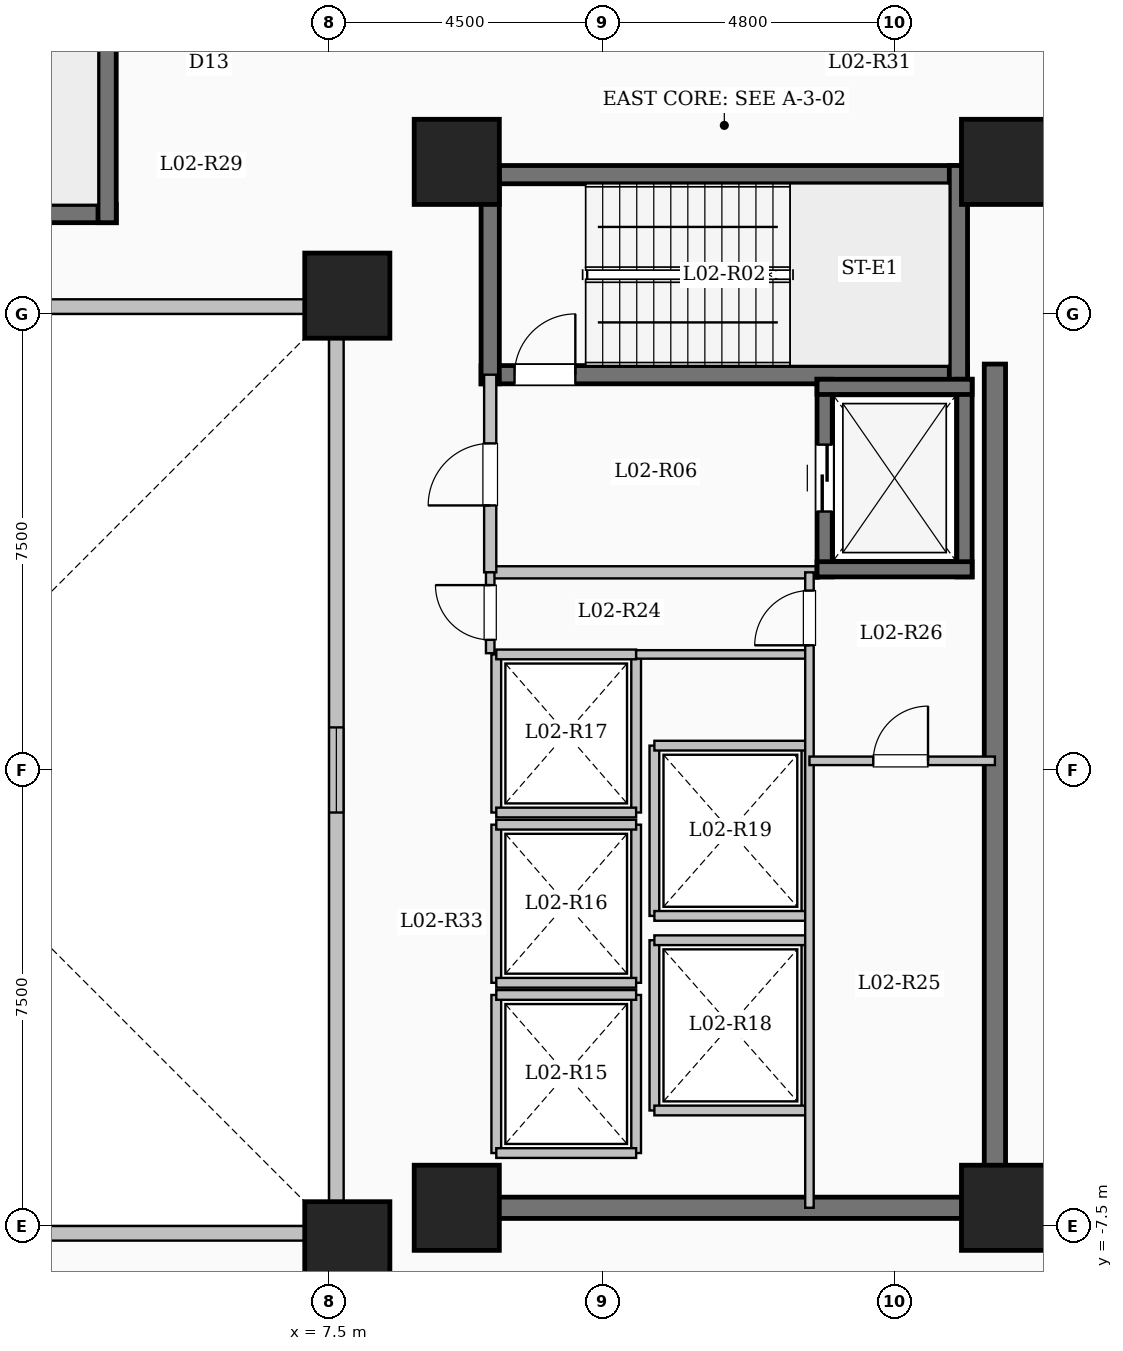
"""IFC4 building model, lengths in metres.
Left out: names, types, materials, properties, quantities, classifications, styles, units other than length and angle.
Written with IfcOpenShell. Run it as: python <this file> out.ifc"""

import sys

from ifc_helpers import new_model, si_unit, direction, frame, frame_2d, origin, origin_2d, place, context, subcontext, project, spatial, rectangle, extrude, element, fill, save


model = new_model("IFC4")
c1 = context("Model", 3, precision=1e-05, world=origin(), true_north=direction((0.0, 1.0)))
c2 = subcontext(c1, "Body", "Model", "MODEL_VIEW")
j1 = project(units=[si_unit("LENGTHUNIT", "METRE"), si_unit("PLANEANGLEUNIT", "RADIAN")], contexts=[c1])
p1 = place(None, origin())
s1 = spatial("IfcSite", under=j1, at=p1, CompositionType="ELEMENT")
p2 = place(p1, origin())
s2 = spatial("IfcBuilding", under=s1, at=p2, CompositionType="ELEMENT")
p3 = place(p2, frame((0.0, 0.0, 9.9)))
s3 = spatial("IfcBuildingStorey", under=s2, at=p3, CompositionType="ELEMENT", Elevation=9.9)
for number, where, z_axis, x_axis in (
    (1, (7.8, -7.8, 0.0), (0.0, 0.0, 1.0), (1.0, 0.0, 0.0)),
    (2, (7.8, 7.8, 0.0), (0.0, 0.0, 1.0), (1.0, 0.0, 0.0)),
    (3, (9.6, -7.2, 0.0), (0.0, 0.0, 1.0), (1.0, 0.0, 0.0)),
    (4, (9.6, 10.0, 0.0), (0.0, 0.0, 1.0), (1.0, 0.0, 0.0)),
    (5, (18.6, -7.2, 0.0), (0.0, 0.0, 1.0), (1.0, 0.0, 0.0)),
    (6, (18.6, 10.0, 0.0), (0.0, 0.0, 1.0), (1.0, 0.0, 0.0)),
):
    element("IfcColumn", number, at=place(p3, frame(where, z_axis=z_axis, x_axis=x_axis)), inside=s3, PredefinedType="COLUMN", context=c2, shape_type="SweptSolid", body=[
        extrude(rectangle(XDim=1.4, YDim=1.4, at=origin_2d()), origin(), (0.0, 0.0, 1.0), 4.5),
    ])
p4 = place(p3, frame((-7.62, -7.62, 0.0), z_axis=(0.0, 0.0, 1.0), x_axis=(1.0, 0.0, 0.0)))
e7 = element("IfcWall", 7, at=p4, inside=s3, PredefinedType="SOLIDWALL", context=c2, shape_type="SweptSolid", body=[
    extrude(rectangle(XDim=15.24, YDim=0.24, at=frame_2d((7.62, 0.0))), origin(), (0.0, 0.0, 1.0), 4.2),
])
p5 = place(p4, frame((6.92, 0.0, 0.95)))
e8 = element("IfcOpeningElement", 8, at=p5, cuts=e7, PredefinedType="OPENING", context=c2, shape_type="SweptSolid", body=[
    extrude(rectangle(XDim=1.4, YDim=1.5, at=frame_2d((0.7, 0.75))), frame((0.0, 0.13, 0.0), z_axis=(0.0, -1.0, 0.0), x_axis=(1.0, 0.0, 0.0)), (0.0, 0.0, 1.0), 0.26),
])
p6 = place(p3, frame((7.62, -7.62, 0.0), z_axis=(0.0, 0.0, 1.0), x_axis=(0.0, 1.0, 0.0)))
e9 = element("IfcWall", 9, at=p6, inside=s3, PredefinedType="SOLIDWALL", context=c2, shape_type="SweptSolid", body=[
    extrude(rectangle(XDim=15.24, YDim=0.24, at=frame_2d((7.62, 0.0))), origin(), (0.0, 0.0, 1.0), 4.2),
])
p7 = place(p6, frame((6.92, 0.0, 0.95)))
e10 = element("IfcOpeningElement", 10, at=p7, cuts=e9, PredefinedType="OPENING", context=c2, shape_type="SweptSolid", body=[
    extrude(rectangle(XDim=1.4, YDim=1.5, at=frame_2d((0.7, 0.75))), frame((0.0, 0.13, 0.0), z_axis=(0.0, -1.0, 0.0), x_axis=(1.0, 0.0, 0.0)), (0.0, 0.0, 1.0), 0.26),
])
p8 = place(p3, frame((7.62, 7.62, 0.0), z_axis=(0.0, 0.0, 1.0), x_axis=(-1.0, 0.0, 0.0)))
e11 = element("IfcWall", 11, at=p8, inside=s3, PredefinedType="SOLIDWALL", context=c2, shape_type="SweptSolid", body=[
    extrude(rectangle(XDim=15.24, YDim=0.24, at=frame_2d((7.62, 0.0))), origin(), (0.0, 0.0, 1.0), 4.2),
])
p9 = place(p8, frame((6.92, 0.0, 0.95)))
e12 = element("IfcOpeningElement", 12, at=p9, cuts=e11, PredefinedType="OPENING", context=c2, shape_type="SweptSolid", body=[
    extrude(rectangle(XDim=1.4, YDim=1.5, at=frame_2d((0.7, 0.75))), frame((0.0, 0.13, 0.0), z_axis=(0.0, -1.0, 0.0), x_axis=(1.0, 0.0, 0.0)), (0.0, 0.0, 1.0), 0.26),
])
p10 = place(p3, frame((10.0, 9.79, 0.0), z_axis=(0.0, 0.0, 1.0), x_axis=(1.0, 0.0, 0.0)))
e13 = element("IfcWall", 13, at=p10, inside=s3, PredefinedType="SHEAR", context=c2, shape_type="SweptSolid", body=[
    extrude(rectangle(XDim=8.0, YDim=0.3, at=frame_2d((4.0, 0.0))), origin(), (0.0, 0.0, 1.0), 4.5),
])
p11 = place(p3, frame((10.0, 6.5, 0.0), z_axis=(0.0, 0.0, 1.0), x_axis=(1.0, 0.0, 0.0)))
e14 = element("IfcWall", 14, at=p11, inside=s3, PredefinedType="SHEAR", context=c2, shape_type="SweptSolid", body=[
    extrude(rectangle(XDim=8.0, YDim=0.3, at=frame_2d((4.0, 0.0))), origin(), (0.0, 0.0, 1.0), 4.5),
])
p12 = place(p11, frame((0.55, 0.0, 0.0)))
e15 = element("IfcOpeningElement", 15, at=p12, cuts=e14, PredefinedType="OPENING", context=c2, shape_type="SweptSolid", body=[
    extrude(rectangle(XDim=1.0, YDim=2.15, at=frame_2d((0.5, 1.075))), frame((0.0, 0.16, 0.0), z_axis=(0.0, -1.0, 0.0), x_axis=(1.0, 0.0, 0.0)), (0.0, 0.0, 1.0), 0.32),
])
for number, where, z_axis, x_axis in (
    (16, (10.15, 6.35, 0.0), (0.0, 0.0, 1.0), (0.0, 1.0, 0.0)),
    (17, (17.85, 6.35, 0.0), (0.0, 0.0, 1.0), (0.0, 1.0, 0.0)),
):
    element("IfcWall", number, at=place(p3, frame(where, z_axis=z_axis, x_axis=x_axis)), inside=s3, PredefinedType="SHEAR", context=c2, shape_type="SweptSolid", body=[
        extrude(rectangle(XDim=3.59, YDim=0.3, at=frame_2d((1.795, 0.0))), origin(), (0.0, 0.0, 1.0), 4.5),
    ])
p13 = place(p3, frame((-4.0, 9.15, 0.0), z_axis=(0.0, 0.0, 1.0), x_axis=(1.0, 0.0, 0.0)))
e18 = element("IfcWall", 18, at=p13, inside=s3, PredefinedType="SHEAR", context=c2, shape_type="SweptSolid", body=[
    extrude(rectangle(XDim=8.0, YDim=0.3, at=frame_2d((4.0, 0.0))), origin(), (0.0, 0.0, 1.0), 4.5),
])
p14 = place(p13, frame((0.55, 0.0, 0.0)))
e19 = element("IfcOpeningElement", 19, at=p14, cuts=e18, PredefinedType="OPENING", context=c2, shape_type="SweptSolid", body=[
    extrude(rectangle(XDim=1.0, YDim=2.15, at=frame_2d((0.5, 1.075))), frame((0.0, 0.16, 0.0), z_axis=(0.0, -1.0, 0.0), x_axis=(1.0, 0.0, 0.0)), (0.0, 0.0, 1.0), 0.32),
])
p15 = place(p3, frame((3.85, 9.0, 0.0), z_axis=(0.0, 0.0, 1.0), x_axis=(0.0, 1.0, 0.0)))
e20 = element("IfcWall", 20, at=p15, inside=s3, PredefinedType="SHEAR", context=c2, shape_type="SweptSolid", body=[
    extrude(rectangle(XDim=3.59, YDim=0.3, at=frame_2d((1.795, 0.0))), origin(), (0.0, 0.0, 1.0), 4.5),
])
p16 = place(p3, frame((10.15, 3.25, 0.0), z_axis=(0.0, 0.0, 1.0), x_axis=(1.0, 0.0, 0.0)))
e21 = element("IfcWall", 21, at=p16, inside=s3, PredefinedType="SOLIDWALL", context=c2, shape_type="SweptSolid", body=[
    extrude(rectangle(XDim=5.4, YDim=0.2, at=frame_2d((2.7, 0.0))), origin(), (0.0, 0.0, 1.0), 4.2),
])
p17 = place(p3, frame((10.15, 3.25, 0.0), z_axis=(0.0, 0.0, 1.0), x_axis=(0.0, 1.0, 0.0)))
e22 = element("IfcWall", 22, at=p17, inside=s3, PredefinedType="SOLIDWALL", context=c2, shape_type="SweptSolid", body=[
    extrude(rectangle(XDim=3.25, YDim=0.2, at=frame_2d((1.625, 0.0))), origin(), (0.0, 0.0, 1.0), 4.2),
])
p18 = place(p17, frame((1.1, 0.0, 0.0)))
e23 = element("IfcOpeningElement", 23, at=p18, cuts=e22, PredefinedType="OPENING", context=c2, shape_type="SweptSolid", body=[
    extrude(rectangle(XDim=1.02, YDim=2.15, at=frame_2d((0.51, 1.075))), frame((0.0, 0.11, 0.0), z_axis=(0.0, -1.0, 0.0), x_axis=(1.0, 0.0, 0.0)), (0.0, 0.0, 1.0), 0.22),
])
p19 = place(p3, frame((15.65, 3.175, 0.0), z_axis=(0.0, 0.0, 1.0), x_axis=(0.0, 1.0, 0.0)))
e24 = element("IfcWall", 24, at=p19, inside=s3, PredefinedType="SHEAR", context=c2, shape_type="SweptSolid", body=[
    extrude(rectangle(XDim=3.25, YDim=0.25, at=frame_2d((1.625, 0.0))), origin(), (0.0, 0.0, 1.0), 4.5),
])
p20 = place(p19, frame((1.075, 0.0, 0.0)))
e25 = element("IfcOpeningElement", 25, at=p20, cuts=e24, PredefinedType="OPENING", context=c2, shape_type="SweptSolid", body=[
    extrude(rectangle(XDim=1.1, YDim=2.15, at=frame_2d((0.55, 1.075))), frame((0.0, 0.135, 0.0), z_axis=(0.0, -1.0, 0.0), x_axis=(1.0, 0.0, 0.0)), (0.0, 0.0, 1.0), 0.27),
])
p21 = place(p3, frame((17.95, 3.175, 0.0), z_axis=(0.0, 0.0, 1.0), x_axis=(0.0, 1.0, 0.0)))
e26 = element("IfcWall", 26, at=p21, inside=s3, PredefinedType="SHEAR", context=c2, shape_type="SweptSolid", body=[
    extrude(rectangle(XDim=3.25, YDim=0.25, at=frame_2d((1.625, 0.0))), origin(), (0.0, 0.0, 1.0), 4.5),
])
for number, where, z_axis, x_axis in (
    (27, (15.525, 3.3, 0.0), (0.0, 0.0, 1.0), (1.0, 0.0, 0.0)),
    (28, (15.525, 6.3, 0.0), (0.0, 0.0, 1.0), (1.0, 0.0, 0.0)),
):
    element("IfcWall", number, at=place(p3, frame(where, z_axis=z_axis, x_axis=x_axis)), inside=s3, PredefinedType="SHEAR", context=c2, shape_type="SweptSolid", body=[
        extrude(rectangle(XDim=2.55, YDim=0.25, at=frame_2d((1.275, 0.0))), origin(), (0.0, 0.0, 1.0), 4.5),
    ])
for number, where, z_axis, x_axis in (
    (29, (10.25, -6.3, 0.0), (0.0, 0.0, 1.0), (0.0, 1.0, 0.0)),
    (30, (12.55, -6.3, 0.0), (0.0, 0.0, 1.0), (0.0, 1.0, 0.0)),
):
    element("IfcWall", number, at=place(p3, frame(where, z_axis=z_axis, x_axis=x_axis)), inside=s3, PredefinedType="SOLIDWALL", context=c2, shape_type="SweptSolid", body=[
        extrude(rectangle(XDim=2.6, YDim=0.16, at=frame_2d((1.3, 0.0))), origin(), (0.0, 0.0, 1.0), 4.2),
    ])
for number, where, z_axis, x_axis in (
    (31, (10.25, -6.3, 0.0), (0.0, 0.0, 1.0), (1.0, 0.0, 0.0)),
    (32, (10.25, -3.7, 0.0), (0.0, 0.0, 1.0), (1.0, 0.0, 0.0)),
):
    element("IfcWall", number, at=place(p3, frame(where, z_axis=z_axis, x_axis=x_axis)), inside=s3, PredefinedType="SOLIDWALL", context=c2, shape_type="SweptSolid", body=[
        extrude(rectangle(XDim=2.3, YDim=0.16, at=frame_2d((1.15, 0.0))), origin(), (0.0, 0.0, 1.0), 4.2),
    ])
for number, where, z_axis, x_axis in (
    (33, (10.25, -3.5, 0.0), (0.0, 0.0, 1.0), (0.0, 1.0, 0.0)),
    (34, (12.55, -3.5, 0.0), (0.0, 0.0, 1.0), (0.0, 1.0, 0.0)),
):
    element("IfcWall", number, at=place(p3, frame(where, z_axis=z_axis, x_axis=x_axis)), inside=s3, PredefinedType="SOLIDWALL", context=c2, shape_type="SweptSolid", body=[
        extrude(rectangle(XDim=2.6, YDim=0.16, at=frame_2d((1.3, 0.0))), origin(), (0.0, 0.0, 1.0), 4.2),
    ])
for number, where, z_axis, x_axis in (
    (35, (10.25, -3.5, 0.0), (0.0, 0.0, 1.0), (1.0, 0.0, 0.0)),
    (36, (10.25, -0.9, 0.0), (0.0, 0.0, 1.0), (1.0, 0.0, 0.0)),
):
    element("IfcWall", number, at=place(p3, frame(where, z_axis=z_axis, x_axis=x_axis)), inside=s3, PredefinedType="SOLIDWALL", context=c2, shape_type="SweptSolid", body=[
        extrude(rectangle(XDim=2.3, YDim=0.16, at=frame_2d((1.15, 0.0))), origin(), (0.0, 0.0, 1.0), 4.2),
    ])
for number, where, z_axis, x_axis in (
    (37, (10.25, -0.7, 0.0), (0.0, 0.0, 1.0), (0.0, 1.0, 0.0)),
    (38, (12.55, -0.7, 0.0), (0.0, 0.0, 1.0), (0.0, 1.0, 0.0)),
):
    element("IfcWall", number, at=place(p3, frame(where, z_axis=z_axis, x_axis=x_axis)), inside=s3, PredefinedType="SOLIDWALL", context=c2, shape_type="SweptSolid", body=[
        extrude(rectangle(XDim=2.6, YDim=0.16, at=frame_2d((1.3, 0.0))), origin(), (0.0, 0.0, 1.0), 4.2),
    ])
for number, where, z_axis, x_axis in (
    (39, (10.25, -0.7, 0.0), (0.0, 0.0, 1.0), (1.0, 0.0, 0.0)),
    (40, (10.25, 1.9, 0.0), (0.0, 0.0, 1.0), (1.0, 0.0, 0.0)),
):
    element("IfcWall", number, at=place(p3, frame(where, z_axis=z_axis, x_axis=x_axis)), inside=s3, PredefinedType="SOLIDWALL", context=c2, shape_type="SweptSolid", body=[
        extrude(rectangle(XDim=2.3, YDim=0.16, at=frame_2d((1.15, 0.0))), origin(), (0.0, 0.0, 1.0), 4.2),
    ])
for number, where, z_axis, x_axis in (
    (41, (12.85, -5.6, 0.0), (0.0, 0.0, 1.0), (0.0, 1.0, 0.0)),
    (42, (15.35, -5.6, 0.0), (0.0, 0.0, 1.0), (0.0, 1.0, 0.0)),
):
    element("IfcWall", number, at=place(p3, frame(where, z_axis=z_axis, x_axis=x_axis)), inside=s3, PredefinedType="SOLIDWALL", context=c2, shape_type="SweptSolid", body=[
        extrude(rectangle(XDim=2.8, YDim=0.16, at=frame_2d((1.4, 0.0))), origin(), (0.0, 0.0, 1.0), 4.2),
    ])
for number, where, z_axis, x_axis in (
    (43, (12.85, -5.6, 0.0), (0.0, 0.0, 1.0), (1.0, 0.0, 0.0)),
    (44, (12.85, -2.8, 0.0), (0.0, 0.0, 1.0), (1.0, 0.0, 0.0)),
):
    element("IfcWall", number, at=place(p3, frame(where, z_axis=z_axis, x_axis=x_axis)), inside=s3, PredefinedType="SOLIDWALL", context=c2, shape_type="SweptSolid", body=[
        extrude(rectangle(XDim=2.5, YDim=0.16, at=frame_2d((1.25, 0.0))), origin(), (0.0, 0.0, 1.0), 4.2),
    ])
for number, where, z_axis, x_axis in (
    (45, (12.85, -2.4, 0.0), (0.0, 0.0, 1.0), (0.0, 1.0, 0.0)),
    (46, (15.35, -2.4, 0.0), (0.0, 0.0, 1.0), (0.0, 1.0, 0.0)),
):
    element("IfcWall", number, at=place(p3, frame(where, z_axis=z_axis, x_axis=x_axis)), inside=s3, PredefinedType="SOLIDWALL", context=c2, shape_type="SweptSolid", body=[
        extrude(rectangle(XDim=2.8, YDim=0.16, at=frame_2d((1.4, 0.0))), origin(), (0.0, 0.0, 1.0), 4.2),
    ])
for number, where, z_axis, x_axis in (
    (47, (12.85, -2.4, 0.0), (0.0, 0.0, 1.0), (1.0, 0.0, 0.0)),
    (48, (12.85, 0.4, 0.0), (0.0, 0.0, 1.0), (1.0, 0.0, 0.0)),
):
    element("IfcWall", number, at=place(p3, frame(where, z_axis=z_axis, x_axis=x_axis)), inside=s3, PredefinedType="SOLIDWALL", context=c2, shape_type="SweptSolid", body=[
        extrude(rectangle(XDim=2.5, YDim=0.16, at=frame_2d((1.25, 0.0))), origin(), (0.0, 0.0, 1.0), 4.2),
    ])
p22 = place(p3, frame((18.45, -7.375, 0.0), z_axis=(0.0, 0.0, 1.0), x_axis=(0.0, 1.0, 0.0)))
e49 = element("IfcWall", 49, at=p22, inside=s3, PredefinedType="SHEAR", context=c2, shape_type="SweptSolid", body=[
    extrude(rectangle(XDim=14.05, YDim=0.35, at=frame_2d((7.025, 0.0))), origin(), (0.0, 0.0, 1.0), 4.5),
])
p23 = place(p3, frame((10.075, -7.2, 0.0), z_axis=(0.0, 0.0, 1.0), x_axis=(1.0, 0.0, 0.0)))
e50 = element("IfcWall", 50, at=p23, inside=s3, PredefinedType="SHEAR", context=c2, shape_type="SweptSolid", body=[
    extrude(rectangle(XDim=8.55, YDim=0.35, at=frame_2d((4.275, 0.0))), origin(), (0.0, 0.0, 1.0), 4.5),
])
p24 = place(p3, frame((12.55, 1.9, 0.0), z_axis=(0.0, 0.0, 1.0), x_axis=(1.0, 0.0, 0.0)))
e51 = element("IfcWall", 51, at=p24, inside=s3, PredefinedType="PARTITIONING", context=c2, shape_type="SweptSolid", body=[
    extrude(rectangle(XDim=2.85, YDim=0.14, at=frame_2d((1.425, 0.0))), origin(), (0.0, 0.0, 1.0), 4.2),
])
p25 = place(p3, frame((10.15, 1.92, 0.0), z_axis=(0.0, 0.0, 1.0), x_axis=(0.0, 1.0, 0.0)))
e52 = element("IfcWall", 52, at=p25, inside=s3, PredefinedType="PARTITIONING", context=c2, shape_type="SweptSolid", body=[
    extrude(rectangle(XDim=1.33, YDim=0.14, at=frame_2d((0.665, 0.0))), origin(), (0.0, 0.0, 1.0), 4.2),
])
p26 = place(p25, frame((0.22, 0.0, 0.0)))
e53 = element("IfcOpeningElement", 53, at=p26, cuts=e52, PredefinedType="OPENING", context=c2, shape_type="SweptSolid", body=[
    extrude(rectangle(XDim=0.9, YDim=2.08, at=frame_2d((0.45, 1.04))), frame((0.0, 0.08, 0.0), z_axis=(0.0, -1.0, 0.0), x_axis=(1.0, 0.0, 0.0)), (0.0, 0.0, 1.0), 0.16),
])
p27 = place(p3, frame((15.4, -7.2, 0.0), z_axis=(0.0, 0.0, 1.0), x_axis=(0.0, 1.0, 0.0)))
e54 = element("IfcWall", 54, at=p27, inside=s3, PredefinedType="PARTITIONING", context=c2, shape_type="SweptSolid", body=[
    extrude(rectangle(XDim=10.45, YDim=0.14, at=frame_2d((5.225, 0.0))), origin(), (0.0, 0.0, 1.0), 4.2),
])
p28 = place(p27, frame((9.25, 0.0, 0.0)))
e55 = element("IfcOpeningElement", 55, at=p28, cuts=e54, PredefinedType="OPENING", context=c2, shape_type="SweptSolid", body=[
    extrude(rectangle(XDim=0.9, YDim=2.08, at=frame_2d((0.45, 1.04))), frame((0.0, 0.08, 0.0), z_axis=(0.0, -1.0, 0.0), x_axis=(1.0, 0.0, 0.0)), (0.0, 0.0, 1.0), 0.16),
])
p29 = place(p3, frame((15.4, 0.15, 0.0), z_axis=(0.0, 0.0, 1.0), x_axis=(1.0, 0.0, 0.0)))
e56 = element("IfcWall", 56, at=p29, inside=s3, PredefinedType="PARTITIONING", context=c2, shape_type="SweptSolid", body=[
    extrude(rectangle(XDim=3.05, YDim=0.14, at=frame_2d((1.525, 0.0))), origin(), (0.0, 0.0, 1.0), 4.2),
])
p30 = place(p29, frame((1.05, 0.0, 0.0)))
e57 = element("IfcOpeningElement", 57, at=p30, cuts=e56, PredefinedType="OPENING", context=c2, shape_type="SweptSolid", body=[
    extrude(rectangle(XDim=0.9, YDim=2.08, at=frame_2d((0.45, 1.04))), frame((0.0, 0.08, 0.0), z_axis=(0.0, -1.0, 0.0), x_axis=(1.0, 0.0, 0.0)), (0.0, 0.0, 1.0), 0.16),
])
p31 = place(p7, origin())
e58 = element("IfcWindow", 58, at=p31, inside=s3, PartitioningType="SINGLE_PANEL", PredefinedType="WINDOW", context=c2, shape_type="SweptSolid", body=[
    extrude(rectangle(XDim=1.4, YDim=1.5, at=frame_2d((0.7, 0.75))), frame((0.0, 0.03, 0.0), z_axis=(0.0, -1.0, 0.0), x_axis=(1.0, 0.0, 0.0)), (0.0, 0.0, 1.0), 0.06),
])
fill(e10, e58)
p32 = place(p12, origin())
e59 = element("IfcDoor", 59, at=p32, inside=s3, OperationType="SINGLE_SWING_RIGHT", PredefinedType="DOOR", context=c2, shape_type="SweptSolid", body=[
    extrude(rectangle(XDim=1.0, YDim=2.15, at=frame_2d((0.5, 1.075))), frame((0.0, 0.025, 0.0), z_axis=(0.0, -1.0, 0.0), x_axis=(1.0, 0.0, 0.0)), (0.0, 0.0, 1.0), 0.05),
])
fill(e15, e59)
p33 = place(p18, origin())
e60 = element("IfcDoor", 60, at=p33, inside=s3, OperationType="SINGLE_SWING_LEFT", PredefinedType="DOOR", context=c2, shape_type="SweptSolid", body=[
    extrude(rectangle(XDim=1.02, YDim=2.15, at=frame_2d((0.51, 1.075))), frame((0.0, 0.025, 0.0), z_axis=(0.0, -1.0, 0.0), x_axis=(1.0, 0.0, 0.0)), (0.0, 0.0, 1.0), 0.05),
])
fill(e23, e60)
p34 = place(p20, origin())
e61 = element("IfcDoor", 61, at=p34, inside=s3, OperationType="SLIDING_TO_LEFT", PredefinedType="DOOR", context=c2, shape_type="SweptSolid", body=[
    extrude(rectangle(XDim=1.1, YDim=2.15, at=frame_2d((0.55, 1.075))), frame((0.0, 0.025, 0.0), z_axis=(0.0, -1.0, 0.0), x_axis=(1.0, 0.0, 0.0)), (0.0, 0.0, 1.0), 0.05),
])
fill(e25, e61)
p35 = place(p26, origin())
e62 = element("IfcDoor", 62, at=p35, inside=s3, OperationType="SINGLE_SWING_RIGHT", PredefinedType="DOOR", context=c2, shape_type="SweptSolid", body=[
    extrude(rectangle(XDim=0.9, YDim=2.08, at=frame_2d((0.45, 1.04))), frame((0.0, 0.025, 0.0), z_axis=(0.0, -1.0, 0.0), x_axis=(1.0, 0.0, 0.0)), (0.0, 0.0, 1.0), 0.05),
])
fill(e53, e62)
p36 = place(p28, origin())
e63 = element("IfcDoor", 63, at=p36, inside=s3, OperationType="SINGLE_SWING_LEFT", PredefinedType="DOOR", context=c2, shape_type="SweptSolid", body=[
    extrude(rectangle(XDim=0.9, YDim=2.08, at=frame_2d((0.45, 1.04))), frame((0.0, 0.025, 0.0), z_axis=(0.0, -1.0, 0.0), x_axis=(1.0, 0.0, 0.0)), (0.0, 0.0, 1.0), 0.05),
])
fill(e55, e63)
p37 = place(p30, origin())
e64 = element("IfcDoor", 64, at=p37, inside=s3, OperationType="SINGLE_SWING_RIGHT", PredefinedType="DOOR", context=c2, shape_type="SweptSolid", body=[
    extrude(rectangle(XDim=0.9, YDim=2.08, at=frame_2d((0.45, 1.04))), frame((0.0, 0.025, 0.0), z_axis=(0.0, -1.0, 0.0), x_axis=(1.0, 0.0, 0.0)), (0.0, 0.0, 1.0), 0.05),
])
fill(e57, e64)
save(model, sys.argv[1])
